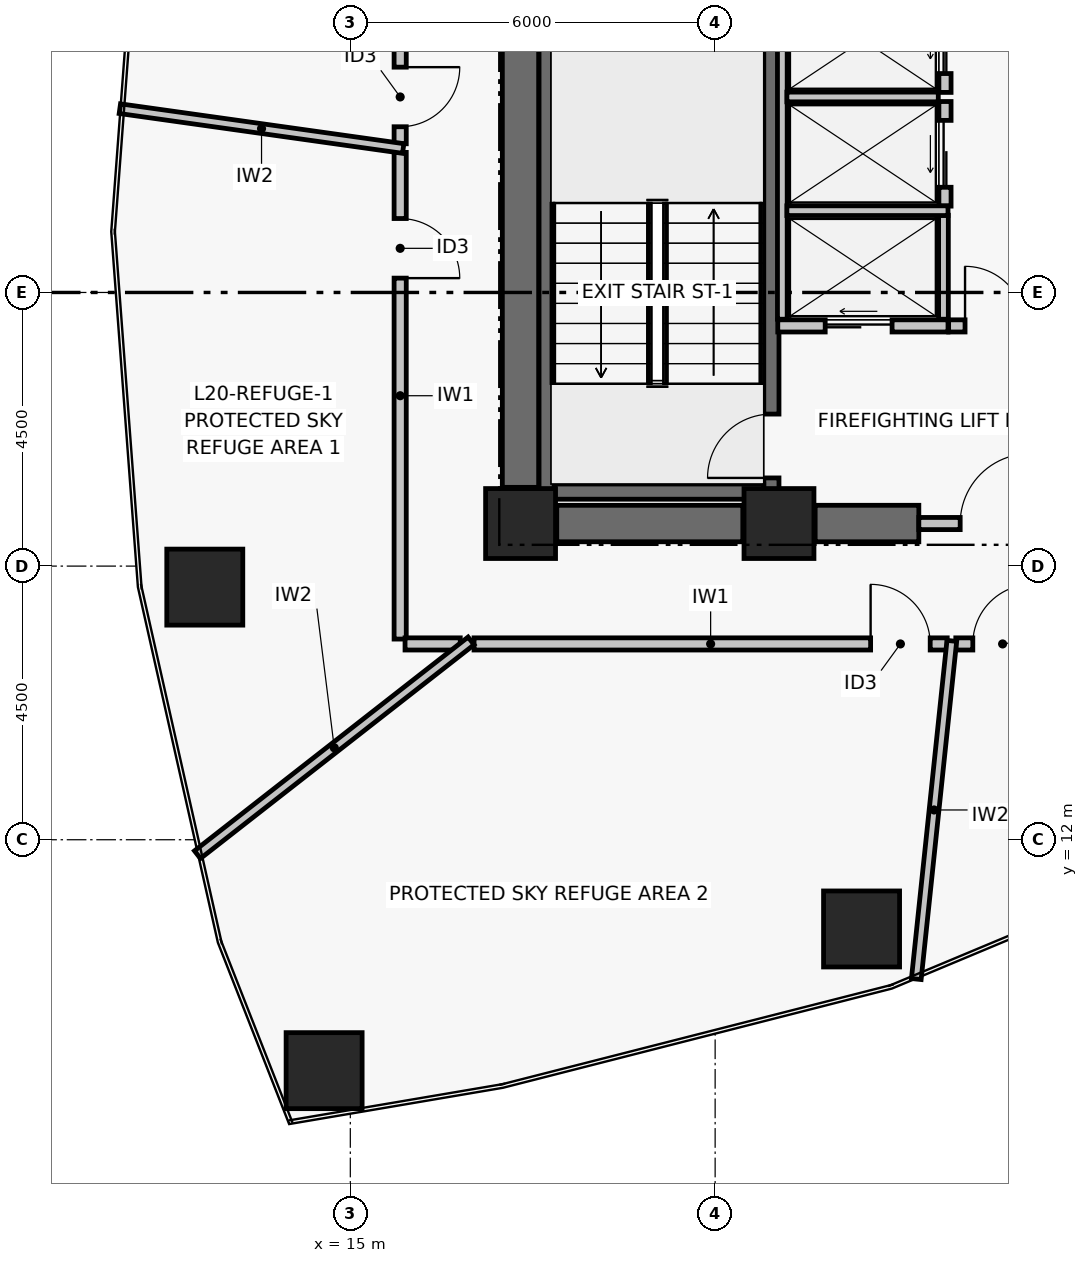
"""IFC4 building model, lengths in metres.
Left out: names, types, materials, properties, quantities, classifications, styles, units other than length and angle.
Written with IfcOpenShell. Run it as: python <this file> out.ifc"""

import sys

from ifc_helpers import new_model, si_unit, direction, frame, frame_2d, origin, origin_2d, place, context, subcontext, project, spatial, rectangle, hollow_rectangle, extrude, element, fill, save


model = new_model("IFC4")
c1 = context("Model", 3, precision=1e-05, world=origin(), true_north=direction((0.0, 1.0)))
c2 = subcontext(c1, "Body", "Model", "MODEL_VIEW")
j1 = project(units=[si_unit("LENGTHUNIT", "METRE"), si_unit("PLANEANGLEUNIT", "RADIAN")], contexts=[c1])
p1 = place(None, origin())
s1 = spatial("IfcSite", under=j1, at=p1, CompositionType="ELEMENT")
p2 = place(p1, origin())
s2 = spatial("IfcBuilding", under=s1, at=p2, CompositionType="ELEMENT")
p3 = place(p2, frame((0.0, 0.0, 83.4)))
s3 = spatial("IfcBuildingStorey", under=s2, at=p3, CompositionType="ELEMENT", Elevation=83.4)
for number, where, z_axis, x_axis in (
    (1, (17.8, 17.2, 0.0), (0.0, 0.0, 1.0), (1.0, 0.0, 0.0)),
    (2, (22.05, 17.2, 0.0), (0.0, 0.0, 1.0), (1.0, 0.0, 0.0)),
):
    element("IfcColumn", number, at=place(p3, frame(where, z_axis=z_axis, x_axis=x_axis)), inside=s3, PredefinedType="COLUMN", context=c2, shape_type="SweptSolid", body=[
        extrude(rectangle(XDim=1.15, YDim=1.15, at=origin_2d()), origin(), (0.0, 0.0, 1.0), 5.7),
    ])
p4 = place(p3, frame((18.395, 17.2, 0.0), z_axis=(0.0, 0.0, 1.0), x_axis=(1.0, 0.0, 0.0)))
e3 = element("IfcWall", 3, at=p4, inside=s3, PredefinedType="SHEAR", context=c2, shape_type="SweptSolid", body=[
    extrude(rectangle(XDim=3.06, YDim=0.6, at=frame_2d((1.53, 0.0))), origin(), (0.0, 0.0, 1.0), 5.45),
])
p5 = place(p3, frame((22.645, 17.2, 0.0), z_axis=(0.0, 0.0, 1.0), x_axis=(1.0, 0.0, 0.0)))
e4 = element("IfcWall", 4, at=p5, inside=s3, PredefinedType="SHEAR", context=c2, shape_type="SweptSolid", body=[
    extrude(rectangle(XDim=1.705, YDim=0.6, at=frame_2d((0.853, 0.0))), origin(), (0.0, 0.0, 1.0), 5.45),
])
p6 = place(p3, frame((17.8, 17.795, 0.0), z_axis=(0.0, 0.0, 1.0), x_axis=(0.0, 1.0, 0.0)))
e5 = element("IfcWall", 5, at=p6, inside=s3, PredefinedType="SHEAR", context=c2, shape_type="SweptSolid", body=[
    extrude(rectangle(XDim=8.41, YDim=0.6, at=frame_2d((4.205, 0.0))), origin(), (0.0, 0.0, 1.0), 5.45),
])
p7 = place(p3, frame((18.229, 17.6, 0.0), z_axis=(0.0, 0.0, 1.0), x_axis=(0.0, 1.0, 0.0)))
e6 = element("IfcWall", 6, at=p7, inside=s3, PredefinedType="SHEAR", context=c2, shape_type="SweptSolid", body=[
    extrude(rectangle(XDim=8.8, YDim=0.25, at=frame_2d((4.4, 0.0))), origin(), (0.0, 0.0, 1.0), 5.45),
])
p8 = place(p3, frame((21.925, 17.6, 0.0), z_axis=(0.0, 0.0, 1.0), x_axis=(0.0, 1.0, 0.0)))
e7 = element("IfcWall", 7, at=p8, inside=s3, PredefinedType="SHEAR", context=c2, shape_type="SweptSolid", body=[
    extrude(rectangle(XDim=8.8, YDim=0.25, at=frame_2d((4.4, 0.0))), origin(), (0.0, 0.0, 1.0), 5.45),
])
p9 = place(p8, frame((0.35, 0.0, 0.0)))
e8 = element("IfcOpeningElement", 8, at=p9, cuts=e7, PredefinedType="OPENING", context=c2, shape_type="SweptSolid", body=[
    extrude(rectangle(XDim=1.05, YDim=2.08, at=frame_2d((0.525, 1.04))), frame((0.0, 0.135, 0.0), z_axis=(0.0, -1.0, 0.0), x_axis=(1.0, 0.0, 0.0)), (0.0, 0.0, 1.0), 0.27),
])
p10 = place(p3, frame((18.354, 17.725, 0.0), z_axis=(0.0, 0.0, 1.0), x_axis=(1.0, 0.0, 0.0)))
e9 = element("IfcWall", 9, at=p10, inside=s3, PredefinedType="SHEAR", context=c2, shape_type="SweptSolid", body=[
    extrude(rectangle(XDim=3.446, YDim=0.25, at=frame_2d((1.723, 0.0))), origin(), (0.0, 0.0, 1.0), 5.45),
])
for number, where, z_axis, x_axis in (
    (10, (12.607, 16.154, 0.0), (0.0, 0.0, 1.0), (1.0, 0.0, 0.0)),
    (11, (14.569, 8.203, 0.0), (0.0, 0.0, 1.0), (1.0, 0.0, 0.0)),
    (12, (23.408, 10.533, 0.0), (0.0, 0.0, 1.0), (1.0, 0.0, 0.0)),
):
    element("IfcColumn", number, at=place(p3, frame(where, z_axis=z_axis, x_axis=x_axis)), inside=s3, PredefinedType="COLUMN", context=c2, shape_type="SweptSolid", body=[
        extrude(hollow_rectangle(XDim=1.25, YDim=1.25, WallThickness=0.05, at=origin_2d()), origin(), (0.0, 0.0, 1.0), 5.7),
    ])
p11 = place(p3, frame((24.35, 17.2, 0.0), z_axis=(0.0, 0.0, 1.0), x_axis=(1.0, 0.0, 0.0)))
e13 = element("IfcWall", 13, at=p11, inside=s3, PredefinedType="PARTITIONING", context=c2, shape_type="SweptSolid", body=[
    extrude(rectangle(XDim=2.5, YDim=0.2, at=frame_2d((1.25, 0.0))), origin(), (0.0, 0.0, 1.0), 4.58),
])
p12 = place(p11, frame((0.68, 0.0, 0.0)))
e14 = element("IfcOpeningElement", 14, at=p12, cuts=e13, PredefinedType="OPENING", context=c2, shape_type="SweptSolid", body=[
    extrude(rectangle(XDim=1.15, YDim=2.08, at=frame_2d((0.575, 1.04))), frame((0.0, 0.11, 0.0), z_axis=(0.0, -1.0, 0.0), x_axis=(1.0, 0.0, 0.0)), (0.0, 0.0, 1.0), 0.22),
])
p13 = place(p3, frame((24.84, 20.45, 0.0), z_axis=(0.0, 0.0, 1.0), x_axis=(1.0, 0.0, 0.0)))
e15 = element("IfcWall", 15, at=p13, inside=s3, PredefinedType="PARTITIONING", context=c2, shape_type="SweptSolid", body=[
    extrude(rectangle(XDim=1.52, YDim=0.2, at=frame_2d((0.76, 0.0))), origin(), (0.0, 0.0, 1.0), 5.45),
])
p14 = place(p13, frame((0.27, 0.0, 0.0)))
e16 = element("IfcOpeningElement", 16, at=p14, cuts=e15, PredefinedType="OPENING", context=c2, shape_type="SweptSolid", body=[
    extrude(rectangle(XDim=0.98, YDim=2.06, at=frame_2d((0.49, 1.03))), frame((0.0, 0.11, 0.0), z_axis=(0.0, -1.0, 0.0), x_axis=(1.0, 0.0, 0.0)), (0.0, 0.0, 1.0), 0.22),
])
p15 = place(p3, frame((22.03, 20.45, 0.0), z_axis=(0.0, 0.0, 1.0), x_axis=(1.0, 0.0, 0.0)))
e17 = element("IfcWall", 17, at=p15, inside=s3, PredefinedType="PARTITIONING", context=c2, shape_type="SweptSolid", body=[
    extrude(rectangle(XDim=2.8, YDim=0.2, at=frame_2d((1.4, 0.0))), origin(), (0.0, 0.0, 1.0), 5.45),
])
p16 = place(p15, frame((0.78, 0.0, 0.0)))
e18 = element("IfcOpeningElement", 18, at=p16, cuts=e17, PredefinedType="OPENING", context=c2, shape_type="SweptSolid", body=[
    extrude(rectangle(XDim=1.1, YDim=2.08, at=frame_2d((0.55, 1.04))), frame((0.0, 0.11, 0.0), z_axis=(0.0, -1.0, 0.0), x_axis=(1.0, 0.0, 0.0)), (0.0, 0.0, 1.0), 0.22),
])
p17 = place(p3, frame((24.78, 22.42, 0.0), z_axis=(0.0, 0.0, 1.0), x_axis=(0.0, 1.0, 0.0)))
e19 = element("IfcWall", 19, at=p17, inside=s3, PredefinedType="PARTITIONING", context=c2, shape_type="SweptSolid", body=[
    extrude(rectangle(XDim=1.72, YDim=0.2, at=frame_2d((0.86, 0.0))), origin(), (0.0, 0.0, 1.0), 5.45),
])
p18 = place(p17, frame((0.31, 0.0, 0.0)))
e20 = element("IfcOpeningElement", 20, at=p18, cuts=e19, PredefinedType="OPENING", context=c2, shape_type="SweptSolid", body=[
    extrude(rectangle(XDim=1.1, YDim=2.08, at=frame_2d((0.55, 1.04))), frame((0.0, 0.11, 0.0), z_axis=(0.0, -1.0, 0.0), x_axis=(1.0, 0.0, 0.0)), (0.0, 0.0, 1.0), 0.22),
])
p19 = place(p3, frame((24.78, 24.29, 0.0), z_axis=(0.0, 0.0, 1.0), x_axis=(0.0, 1.0, 0.0)))
e21 = element("IfcWall", 21, at=p19, inside=s3, PredefinedType="PARTITIONING", context=c2, shape_type="SweptSolid", body=[
    extrude(rectangle(XDim=1.72, YDim=0.2, at=frame_2d((0.86, 0.0))), origin(), (0.0, 0.0, 1.0), 5.45),
])
p20 = place(p19, frame((0.31, 0.0, 0.0)))
e22 = element("IfcOpeningElement", 22, at=p20, cuts=e21, PredefinedType="OPENING", context=c2, shape_type="SweptSolid", body=[
    extrude(rectangle(XDim=1.1, YDim=2.08, at=frame_2d((0.55, 1.04))), frame((0.0, 0.11, 0.0), z_axis=(0.0, -1.0, 0.0), x_axis=(1.0, 0.0, 0.0)), (0.0, 0.0, 1.0), 0.22),
])
p21 = place(p3, frame((22.105, 20.56, 0.0), z_axis=(0.0, 0.0, 1.0), x_axis=(0.0, 1.0, 0.0)))
e23 = element("IfcWall", 23, at=p21, inside=s3, PredefinedType="PARTITIONING", context=c2, shape_type="SweptSolid", body=[
    extrude(rectangle(XDim=5.45, YDim=0.16, at=frame_2d((2.725, 0.0))), origin(), (0.0, 0.0, 1.0), 5.45),
])
p22 = place(p3, frame((24.755, 20.56, 0.0), z_axis=(0.0, 0.0, 1.0), x_axis=(0.0, 1.0, 0.0)))
e24 = element("IfcWall", 24, at=p22, inside=s3, PredefinedType="PARTITIONING", context=c2, shape_type="SweptSolid", body=[
    extrude(rectangle(XDim=1.71, YDim=0.16, at=frame_2d((0.855, 0.0))), origin(), (0.0, 0.0, 1.0), 5.45),
])
p23 = place(p3, frame((22.18, 22.345, 0.0), z_axis=(0.0, 0.0, 1.0), x_axis=(1.0, 0.0, 0.0)))
e25 = element("IfcWall", 25, at=p23, inside=s3, PredefinedType="PARTITIONING", context=c2, shape_type="SweptSolid", body=[
    extrude(rectangle(XDim=2.65, YDim=0.16, at=frame_2d((1.325, 0.0))), origin(), (0.0, 0.0, 1.0), 5.45),
])
p24 = place(p3, frame((22.18, 24.215, 0.0), z_axis=(0.0, 0.0, 1.0), x_axis=(1.0, 0.0, 0.0)))
e26 = element("IfcWall", 26, at=p24, inside=s3, PredefinedType="PARTITIONING", context=c2, shape_type="SweptSolid", body=[
    extrude(rectangle(XDim=2.49, YDim=0.16, at=frame_2d((1.245, 0.0))), origin(), (0.0, 0.0, 1.0), 5.45),
])
p25 = place(p3, frame((15.82, 23.304, 0.0), z_axis=(0.0, 0.0, 1.0), x_axis=(0.0, -1.0, 0.0)))
e27 = element("IfcWall", 27, at=p25, inside=s3, PredefinedType="PARTITIONING", context=c2, shape_type="SweptSolid", body=[
    extrude(rectangle(XDim=8.004, YDim=0.2, at=frame_2d((4.002, 0.0))), origin(), (0.0, 0.0, 1.0), 4.03),
])
p26 = place(p25, frame((1.088, 0.0, 0.0)))
e28 = element("IfcOpeningElement", 28, at=p26, cuts=e27, PredefinedType="OPENING", context=c2, shape_type="SweptSolid", body=[
    extrude(rectangle(XDim=0.98, YDim=2.06, at=frame_2d((0.49, 1.03))), frame((0.0, 0.11, 0.0), z_axis=(0.0, -1.0, 0.0), x_axis=(1.0, 0.0, 0.0)), (0.0, 0.0, 1.0), 0.22),
])
p27 = place(p3, frame((15.9, 15.22, 0.0), z_axis=(0.0, 0.0, 1.0), x_axis=(1.0, 0.0, 0.0)))
e29 = element("IfcWall", 29, at=p27, inside=s3, PredefinedType="PARTITIONING", context=c2, shape_type="SweptSolid", body=[
    extrude(rectangle(XDim=0.908, YDim=0.2, at=frame_2d((0.454, 0.0))), origin(), (0.0, 0.0, 1.0), 4.03),
])
p28 = place(p3, frame((17.035, 15.22, 0.0), z_axis=(0.0, 0.0, 1.0), x_axis=(1.0, 0.0, 0.0)))
e30 = element("IfcWall", 30, at=p28, inside=s3, PredefinedType="PARTITIONING", context=c2, shape_type="SweptSolid", body=[
    extrude(rectangle(XDim=7.782, YDim=0.2, at=frame_2d((3.891, 0.0))), origin(), (0.0, 0.0, 1.0), 4.03),
])
p29 = place(p28, frame((6.522, 0.0, 0.0)))
e31 = element("IfcOpeningElement", 31, at=p29, cuts=e30, PredefinedType="OPENING", context=c2, shape_type="SweptSolid", body=[
    extrude(rectangle(XDim=0.98, YDim=2.06, at=frame_2d((0.49, 1.03))), frame((0.0, 0.11, 0.0), z_axis=(0.0, -1.0, 0.0), x_axis=(1.0, 0.0, 0.0)), (0.0, 0.0, 1.0), 0.22),
])
p30 = place(p3, frame((24.958, 15.22, 0.0), z_axis=(0.0, 0.0, 1.0), x_axis=(1.0, 0.0, 0.0)))
e32 = element("IfcWall", 32, at=p30, inside=s3, PredefinedType="PARTITIONING", context=c2, shape_type="SweptSolid", body=[
    extrude(rectangle(XDim=6.747, YDim=0.2, at=frame_2d((3.374, 0.0))), origin(), (0.0, 0.0, 1.0), 4.98),
])
p31 = place(p30, frame((0.28, 0.0, 0.0)))
e33 = element("IfcOpeningElement", 33, at=p31, cuts=e32, PredefinedType="OPENING", context=c2, shape_type="SweptSolid", body=[
    extrude(rectangle(XDim=0.98, YDim=2.06, at=frame_2d((0.49, 1.03))), frame((0.0, 0.11, 0.0), z_axis=(0.0, -1.0, 0.0), x_axis=(1.0, 0.0, 0.0)), (0.0, 0.0, 1.0), 0.22),
])
p32 = place(p3, frame((15.82, 28.7, 0.0), z_axis=(0.0, 0.0, 1.0), x_axis=(0.0, -1.0, 0.0)))
e34 = element("IfcWall", 34, at=p32, inside=s3, PredefinedType="PARTITIONING", context=c2, shape_type="SweptSolid", body=[
    extrude(rectangle(XDim=5.255, YDim=0.2, at=frame_2d((2.627, 0.0))), origin(), (0.0, 0.0, 1.0), 4.03),
])
p33 = place(p32, frame((3.995, 0.0, 0.0)))
e35 = element("IfcOpeningElement", 35, at=p33, cuts=e34, PredefinedType="OPENING", context=c2, shape_type="SweptSolid", body=[
    extrude(rectangle(XDim=0.98, YDim=2.06, at=frame_2d((0.49, 1.03))), frame((0.0, 0.11, 0.0), z_axis=(0.0, -1.0, 0.0), x_axis=(1.0, 0.0, 0.0)), (0.0, 0.0, 1.0), 0.22),
])
p34 = place(p3, frame((15.87, 23.367, 0.0), z_axis=(0.0, 0.0, 1.0), x_axis=(-0.990266524338, 0.139184089518, 0.0)))
e36 = element("IfcWall", 36, at=p34, inside=s3, PredefinedType="PARTITIONING", context=c2, shape_type="SweptSolid", body=[
    extrude(rectangle(XDim=4.706, YDim=0.16, at=frame_2d((2.353, 0.0))), origin(), (0.0, 0.0, 1.0), 4.83),
])
p35 = place(p3, frame((16.986, 15.27, 0.0), z_axis=(0.0, 0.0, 1.0), x_axis=(-0.788008168745, -0.615664783784, 0.0)))
e37 = element("IfcWall", 37, at=p35, inside=s3, PredefinedType="PARTITIONING", context=c2, shape_type="SweptSolid", body=[
    extrude(rectangle(XDim=5.71, YDim=0.16, at=frame_2d((2.855, 0.0))), origin(), (0.0, 0.0, 1.0), 4.03),
])
p36 = place(p3, frame((24.893, 15.27, 0.0), z_axis=(0.0, 0.0, 1.0), x_axis=(-0.104530226711, -0.994521710021, 0.0)))
e38 = element("IfcWall", 38, at=p36, inside=s3, PredefinedType="PARTITIONING", context=c2, shape_type="SweptSolid", body=[
    extrude(rectangle(XDim=5.591, YDim=0.16, at=frame_2d((2.796, 0.0))), origin(), (0.0, 0.0, 1.0), 4.83),
])
p37 = place(p9, origin())
e39 = element("IfcDoor", 39, at=p37, inside=s3, OperationType="SINGLE_SWING_LEFT", PredefinedType="DOOR", context=c2, shape_type="SweptSolid", body=[
    extrude(rectangle(XDim=1.05, YDim=2.08, at=frame_2d((0.525, 1.04))), frame((0.0, 0.025, 0.0), z_axis=(0.0, -1.0, 0.0), x_axis=(1.0, 0.0, 0.0)), (0.0, 0.0, 1.0), 0.05),
])
fill(e8, e39)
p38 = place(p12, origin())
e40 = element("IfcDoor", 40, at=p38, inside=s3, OperationType="SINGLE_SWING_RIGHT", PredefinedType="DOOR", context=c2, shape_type="SweptSolid", body=[
    extrude(rectangle(XDim=1.15, YDim=2.08, at=frame_2d((0.575, 1.04))), frame((0.0, 0.025, 0.0), z_axis=(0.0, -1.0, 0.0), x_axis=(1.0, 0.0, 0.0)), (0.0, 0.0, 1.0), 0.05),
])
fill(e14, e40)
p39 = place(p14, origin())
e41 = element("IfcDoor", 41, at=p39, inside=s3, OperationType="SINGLE_SWING_LEFT", PredefinedType="DOOR", context=c2, shape_type="SweptSolid", body=[
    extrude(rectangle(XDim=0.98, YDim=2.06, at=frame_2d((0.49, 1.03))), frame((0.0, 0.025, 0.0), z_axis=(0.0, -1.0, 0.0), x_axis=(1.0, 0.0, 0.0)), (0.0, 0.0, 1.0), 0.05),
])
fill(e16, e41)
p40 = place(p16, origin())
e42 = element("IfcDoor", 42, at=p40, inside=s3, OperationType="DOUBLE_DOOR_SLIDING", PredefinedType="DOOR", context=c2, shape_type="SweptSolid", body=[
    extrude(rectangle(XDim=1.1, YDim=2.08, at=frame_2d((0.55, 1.04))), frame((0.0, 0.025, 0.0), z_axis=(0.0, -1.0, 0.0), x_axis=(1.0, 0.0, 0.0)), (0.0, 0.0, 1.0), 0.05),
])
fill(e18, e42)
p41 = place(p18, origin())
e43 = element("IfcDoor", 43, at=p41, inside=s3, OperationType="DOUBLE_DOOR_SLIDING", PredefinedType="DOOR", context=c2, shape_type="SweptSolid", body=[
    extrude(rectangle(XDim=1.1, YDim=2.08, at=frame_2d((0.55, 1.04))), frame((0.0, 0.025, 0.0), z_axis=(0.0, -1.0, 0.0), x_axis=(1.0, 0.0, 0.0)), (0.0, 0.0, 1.0), 0.05),
])
fill(e20, e43)
p42 = place(p20, origin())
e44 = element("IfcDoor", 44, at=p42, inside=s3, OperationType="DOUBLE_DOOR_SLIDING", PredefinedType="DOOR", context=c2, shape_type="SweptSolid", body=[
    extrude(rectangle(XDim=1.1, YDim=2.08, at=frame_2d((0.55, 1.04))), frame((0.0, 0.025, 0.0), z_axis=(0.0, -1.0, 0.0), x_axis=(1.0, 0.0, 0.0)), (0.0, 0.0, 1.0), 0.05),
])
fill(e22, e44)
p43 = place(p26, origin())
e45 = element("IfcDoor", 45, at=p43, inside=s3, OperationType="SINGLE_SWING_RIGHT", PredefinedType="DOOR", context=c2, shape_type="SweptSolid", body=[
    extrude(rectangle(XDim=0.98, YDim=2.06, at=frame_2d((0.49, 1.03))), frame((0.0, 0.025, 0.0), z_axis=(0.0, -1.0, 0.0), x_axis=(1.0, 0.0, 0.0)), (0.0, 0.0, 1.0), 0.05),
])
fill(e28, e45)
p44 = place(p29, origin())
e46 = element("IfcDoor", 46, at=p44, inside=s3, OperationType="SINGLE_SWING_LEFT", PredefinedType="DOOR", context=c2, shape_type="SweptSolid", body=[
    extrude(rectangle(XDim=0.98, YDim=2.06, at=frame_2d((0.49, 1.03))), frame((0.0, 0.025, 0.0), z_axis=(0.0, -1.0, 0.0), x_axis=(1.0, 0.0, 0.0)), (0.0, 0.0, 1.0), 0.05),
])
fill(e31, e46)
p45 = place(p31, origin())
e47 = element("IfcDoor", 47, at=p45, inside=s3, OperationType="SINGLE_SWING_RIGHT", PredefinedType="DOOR", context=c2, shape_type="SweptSolid", body=[
    extrude(rectangle(XDim=0.98, YDim=2.06, at=frame_2d((0.49, 1.03))), frame((0.0, 0.025, 0.0), z_axis=(0.0, -1.0, 0.0), x_axis=(1.0, 0.0, 0.0)), (0.0, 0.0, 1.0), 0.05),
])
fill(e33, e47)
p46 = place(p33, origin())
e48 = element("IfcDoor", 48, at=p46, inside=s3, OperationType="SINGLE_SWING_LEFT", PredefinedType="DOOR", context=c2, shape_type="SweptSolid", body=[
    extrude(rectangle(XDim=0.98, YDim=2.06, at=frame_2d((0.49, 1.03))), frame((0.0, 0.025, 0.0), z_axis=(0.0, -1.0, 0.0), x_axis=(1.0, 0.0, 0.0)), (0.0, 0.0, 1.0), 0.05),
])
fill(e35, e48)
save(model, sys.argv[1])
